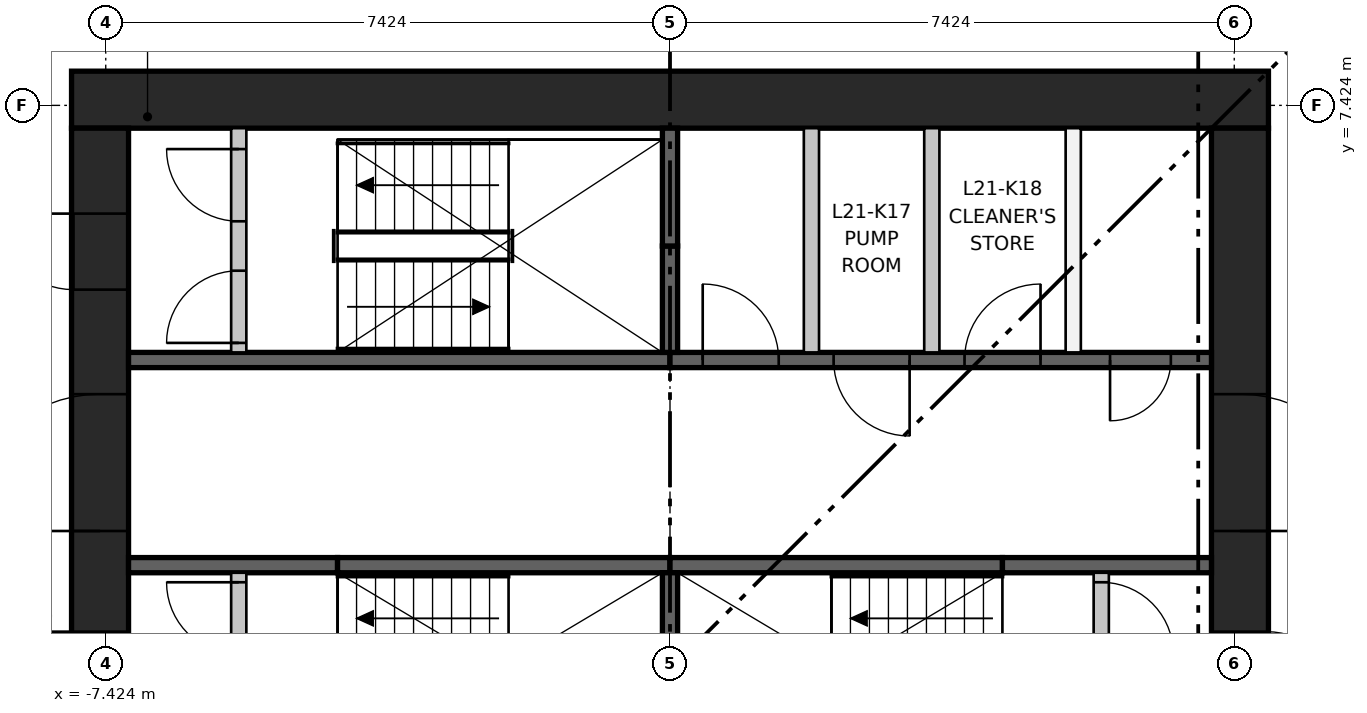
"""IFC4 building model, lengths in metres.
Left out: names, types, materials, properties, quantities, classifications, styles, units other than length and angle.
Written with IfcOpenShell. Run it as: python <this file> out.ifc"""

import sys

from ifc_helpers import new_model, si_unit, direction, frame, frame_2d, origin, place, context, subcontext, project, spatial, rectangle, extrude, element, fill, save


model = new_model("IFC4")
c1 = context("Model", 3, precision=1e-05, world=origin(), true_north=direction((0.0, 1.0)))
c2 = subcontext(c1, "Body", "Model", "MODEL_VIEW")
j1 = project(units=[si_unit("LENGTHUNIT", "METRE"), si_unit("PLANEANGLEUNIT", "RADIAN")], contexts=[c1])
p1 = place(None, origin())
s1 = spatial("IfcSite", under=j1, at=p1, CompositionType="ELEMENT")
p2 = place(p1, origin())
s2 = spatial("IfcBuilding", under=s1, at=p2, CompositionType="ELEMENT")
p3 = place(p2, frame((0.0, 0.0, 83.7)))
s3 = spatial("IfcBuildingStorey", under=s2, at=p3, CompositionType="ELEMENT", Elevation=83.7)
p4 = place(p3, frame((-7.874, 7.499, 0.0), z_axis=(0.0, 0.0, 1.0), x_axis=(1.0, 0.0, 0.0)))
e1 = element("IfcWall", 1, at=p4, inside=s3, PredefinedType="SHEAR", context=c2, shape_type="SweptSolid", body=[
    extrude(rectangle(XDim=15.748, YDim=0.75, at=frame_2d((7.874, 0.0))), origin(), (0.0, 0.0, 1.0), 3.65),
])
p5 = place(p3, frame((-7.499, -7.124, 0.0), z_axis=(0.0, 0.0, 1.0), x_axis=(0.0, 1.0, 0.0)))
e2 = element("IfcWall", 2, at=p5, inside=s3, PredefinedType="SHEAR", context=c2, shape_type="SweptSolid", body=[
    extrude(rectangle(XDim=14.248, YDim=0.75, at=frame_2d((7.124, 0.0))), origin(), (0.0, 0.0, 1.0), 3.65),
])
p6 = place(p5, frame((6.624, 0.0, 0.0)))
e3 = element("IfcOpeningElement", 3, at=p6, cuts=e2, PredefinedType="OPENING", context=c2, shape_type="SweptSolid", body=[
    extrude(rectangle(XDim=1.0, YDim=2.1, at=frame_2d((0.5, 1.05))), frame((0.0, 0.385, 0.0), z_axis=(0.0, -1.0, 0.0), x_axis=(1.0, 0.0, 0.0)), (0.0, 0.0, 1.0), 0.77),
])
p7 = place(p5, frame((3.5, 0.0, 0.0)))
e4 = element("IfcOpeningElement", 4, at=p7, cuts=e2, PredefinedType="OPENING", context=c2, shape_type="SweptSolid", body=[
    extrude(rectangle(XDim=1.8, YDim=2.1, at=frame_2d((0.9, 1.05))), frame((0.0, 0.385, 0.0), z_axis=(0.0, -1.0, 0.0), x_axis=(1.0, 0.0, 0.0)), (0.0, 0.0, 1.0), 0.77),
])
p8 = place(p5, frame((8.948, 0.0, 0.0)))
e5 = element("IfcOpeningElement", 5, at=p8, cuts=e2, PredefinedType="OPENING", context=c2, shape_type="SweptSolid", body=[
    extrude(rectangle(XDim=1.8, YDim=2.1, at=frame_2d((0.9, 1.05))), frame((0.0, 0.385, 0.0), z_axis=(0.0, -1.0, 0.0), x_axis=(1.0, 0.0, 0.0)), (0.0, 0.0, 1.0), 0.77),
])
p9 = place(p5, frame((12.124, 0.0, 0.0)))
e6 = element("IfcOpeningElement", 6, at=p9, cuts=e2, PredefinedType="OPENING", context=c2, shape_type="SweptSolid", body=[
    extrude(rectangle(XDim=1.0, YDim=2.1, at=frame_2d((0.5, 1.05))), frame((0.0, 0.385, 0.0), z_axis=(0.0, -1.0, 0.0), x_axis=(1.0, 0.0, 0.0)), (0.0, 0.0, 1.0), 0.77),
])
p10 = place(p3, frame((7.499, -7.124, 0.0), z_axis=(0.0, 0.0, 1.0), x_axis=(0.0, 1.0, 0.0)))
e7 = element("IfcWall", 7, at=p10, inside=s3, PredefinedType="SHEAR", context=c2, shape_type="SweptSolid", body=[
    extrude(rectangle(XDim=14.248, YDim=0.75, at=frame_2d((7.124, 0.0))), origin(), (0.0, 0.0, 1.0), 3.65),
])
p11 = place(p10, frame((6.624, 0.0, 0.0)))
e8 = element("IfcOpeningElement", 8, at=p11, cuts=e7, PredefinedType="OPENING", context=c2, shape_type="SweptSolid", body=[
    extrude(rectangle(XDim=1.0, YDim=2.1, at=frame_2d((0.5, 1.05))), frame((0.0, 0.385, 0.0), z_axis=(0.0, -1.0, 0.0), x_axis=(1.0, 0.0, 0.0)), (0.0, 0.0, 1.0), 0.77),
])
p12 = place(p10, frame((3.5, 0.0, 0.0)))
e9 = element("IfcOpeningElement", 9, at=p12, cuts=e7, PredefinedType="OPENING", context=c2, shape_type="SweptSolid", body=[
    extrude(rectangle(XDim=1.8, YDim=2.1, at=frame_2d((0.9, 1.05))), frame((0.0, 0.385, 0.0), z_axis=(0.0, -1.0, 0.0), x_axis=(1.0, 0.0, 0.0)), (0.0, 0.0, 1.0), 0.77),
])
p13 = place(p10, frame((8.948, 0.0, 0.0)))
e10 = element("IfcOpeningElement", 10, at=p13, cuts=e7, PredefinedType="OPENING", context=c2, shape_type="SweptSolid", body=[
    extrude(rectangle(XDim=1.8, YDim=2.1, at=frame_2d((0.9, 1.05))), frame((0.0, 0.385, 0.0), z_axis=(0.0, -1.0, 0.0), x_axis=(1.0, 0.0, 0.0)), (0.0, 0.0, 1.0), 0.77),
])
p14 = place(p3, frame((-7.124, 4.074, 0.0), z_axis=(0.0, 0.0, 1.0), x_axis=(1.0, 0.0, 0.0)))
e11 = element("IfcWall", 11, at=p14, inside=s3, PredefinedType="SHEAR", context=c2, shape_type="SweptSolid", body=[
    extrude(rectangle(XDim=7.124, YDim=0.2, at=frame_2d((3.562, 0.0))), origin(), (0.0, 0.0, 1.0), 3.3),
])
p15 = place(p3, frame((0.0, 4.074, 0.0), z_axis=(0.0, 0.0, 1.0), x_axis=(1.0, 0.0, 0.0)))
e12 = element("IfcWall", 12, at=p15, inside=s3, PredefinedType="SHEAR", context=c2, shape_type="SweptSolid", body=[
    extrude(rectangle(XDim=7.124, YDim=0.2, at=frame_2d((3.562, 0.0))), origin(), (0.0, 0.0, 1.0), 3.3),
])
p16 = place(p15, frame((0.43, 0.0, 0.0)))
e13 = element("IfcOpeningElement", 13, at=p16, cuts=e12, PredefinedType="OPENING", context=c2, shape_type="SweptSolid", body=[
    extrude(rectangle(XDim=1.0, YDim=2.1, at=frame_2d((0.5, 1.05))), frame((0.0, 0.11, 0.0), z_axis=(0.0, -1.0, 0.0), x_axis=(1.0, 0.0, 0.0)), (0.0, 0.0, 1.0), 0.22),
])
p17 = place(p15, frame((2.153, 0.0, 0.0)))
e14 = element("IfcOpeningElement", 14, at=p17, cuts=e12, PredefinedType="OPENING", context=c2, shape_type="SweptSolid", body=[
    extrude(rectangle(XDim=1.0, YDim=2.1, at=frame_2d((0.5, 1.05))), frame((0.0, 0.11, 0.0), z_axis=(0.0, -1.0, 0.0), x_axis=(1.0, 0.0, 0.0)), (0.0, 0.0, 1.0), 0.22),
])
p18 = place(p15, frame((3.875, 0.0, 0.0)))
e15 = element("IfcOpeningElement", 15, at=p18, cuts=e12, PredefinedType="OPENING", context=c2, shape_type="SweptSolid", body=[
    extrude(rectangle(XDim=1.0, YDim=2.1, at=frame_2d((0.5, 1.05))), frame((0.0, 0.11, 0.0), z_axis=(0.0, -1.0, 0.0), x_axis=(1.0, 0.0, 0.0)), (0.0, 0.0, 1.0), 0.22),
])
p19 = place(p15, frame((5.79, 0.0, 0.0)))
e16 = element("IfcOpeningElement", 16, at=p19, cuts=e12, PredefinedType="OPENING", context=c2, shape_type="SweptSolid", body=[
    extrude(rectangle(XDim=0.8, YDim=2.1, at=frame_2d((0.4, 1.05))), frame((0.0, 0.11, 0.0), z_axis=(0.0, -1.0, 0.0), x_axis=(1.0, 0.0, 0.0)), (0.0, 0.0, 1.0), 0.22),
])
p20 = place(p3, frame((-7.124, 1.375, 0.0), z_axis=(0.0, 0.0, 1.0), x_axis=(1.0, 0.0, 0.0)))
e17 = element("IfcWall", 17, at=p20, inside=s3, PredefinedType="SHEAR", context=c2, shape_type="SweptSolid", body=[
    extrude(rectangle(XDim=2.75, YDim=0.2, at=frame_2d((1.375, 0.0))), origin(), (0.0, 0.0, 1.0), 3.3),
])
for number, where, z_axis, x_axis in (
    (18, (-4.374, 1.375, 0.0), (0.0, 0.0, 1.0), (1.0, 0.0, 0.0)),
    (19, (0.0, 1.375, 0.0), (0.0, 0.0, 1.0), (1.0, 0.0, 0.0)),
):
    element("IfcWall", number, at=place(p3, frame(where, z_axis=z_axis, x_axis=x_axis)), inside=s3, PredefinedType="SHEAR", context=c2, shape_type="SweptSolid", body=[
        extrude(rectangle(XDim=4.374, YDim=0.2, at=frame_2d((2.187, 0.0))), origin(), (0.0, 0.0, 1.0), 3.3),
    ])
p21 = place(p3, frame((4.374, 1.375, 0.0), z_axis=(0.0, 0.0, 1.0), x_axis=(1.0, 0.0, 0.0)))
e20 = element("IfcWall", 20, at=p21, inside=s3, PredefinedType="SHEAR", context=c2, shape_type="SweptSolid", body=[
    extrude(rectangle(XDim=2.75, YDim=0.2, at=frame_2d((1.375, 0.0))), origin(), (0.0, 0.0, 1.0), 3.3),
])
p22 = place(p3, frame((0.0, -1.275, 0.0), z_axis=(0.0, 0.0, 1.0), x_axis=(0.0, 1.0, 0.0)))
e21 = element("IfcWall", 21, at=p22, inside=s3, PredefinedType="SHEAR", context=c2, shape_type="SweptSolid", body=[
    extrude(rectangle(XDim=2.55, YDim=0.2, at=frame_2d((1.275, 0.0))), origin(), (0.0, 0.0, 1.0), 3.3),
])
p23 = place(p3, frame((0.0, 4.174, 0.0), z_axis=(0.0, 0.0, 1.0), x_axis=(0.0, 1.0, 0.0)))
e22 = element("IfcWall", 22, at=p23, inside=s3, PredefinedType="SHEAR", context=c2, shape_type="SweptSolid", body=[
    extrude(rectangle(XDim=1.4, YDim=0.2, at=frame_2d((0.7, 0.0))), origin(), (0.0, 0.0, 1.0), 3.3),
])
p24 = place(p3, frame((0.0, 5.574, 0.0), z_axis=(0.0, 0.0, 1.0), x_axis=(0.0, 1.0, 0.0)))
e23 = element("IfcWall", 23, at=p24, inside=s3, PredefinedType="SHEAR", context=c2, shape_type="SweptSolid", body=[
    extrude(rectangle(XDim=1.55, YDim=0.2, at=frame_2d((0.775, 0.0))), origin(), (0.0, 0.0, 1.0), 3.3),
])
for number, where, z_axis, x_axis in (
    (24, (1.861, 4.174, 0.0), (0.0, 0.0, 1.0), (0.0, 1.0, 0.0)),
    (25, (3.445, 4.174, 0.0), (0.0, 0.0, 1.0), (0.0, 1.0, 0.0)),
    (26, (5.305, 4.174, 0.0), (0.0, 0.0, 1.0), (0.0, 1.0, 0.0)),
):
    element("IfcWall", number, at=place(p3, frame(where, z_axis=z_axis, x_axis=x_axis)), inside=s3, PredefinedType="PARTITIONING", context=c2, shape_type="SweptSolid", body=[
        extrude(rectangle(XDim=2.95, YDim=0.2, at=frame_2d((1.475, 0.0))), origin(), (0.0, 0.0, 1.0), 3.3),
    ])
p25 = place(p3, frame((-5.674, -1.275, 0.0), z_axis=(0.0, 0.0, 1.0), x_axis=(0.0, 1.0, 0.0)))
e27 = element("IfcWall", 27, at=p25, inside=s3, PredefinedType="PARTITIONING", context=c2, shape_type="SweptSolid", body=[
    extrude(rectangle(XDim=2.55, YDim=0.2, at=frame_2d((1.275, 0.0))), origin(), (0.0, 0.0, 1.0), 3.3),
])
p26 = place(p25, frame((0.125, 0.0, 0.0)))
e28 = element("IfcOpeningElement", 28, at=p26, cuts=e27, PredefinedType="OPENING", context=c2, shape_type="SweptSolid", body=[
    extrude(rectangle(XDim=0.95, YDim=2.1, at=frame_2d((0.475, 1.05))), frame((0.0, 0.11, 0.0), z_axis=(0.0, -1.0, 0.0), x_axis=(1.0, 0.0, 0.0)), (0.0, 0.0, 1.0), 0.22),
])
p27 = place(p25, frame((1.475, 0.0, 0.0)))
e29 = element("IfcOpeningElement", 29, at=p27, cuts=e27, PredefinedType="OPENING", context=c2, shape_type="SweptSolid", body=[
    extrude(rectangle(XDim=0.95, YDim=2.1, at=frame_2d((0.475, 1.05))), frame((0.0, 0.11, 0.0), z_axis=(0.0, -1.0, 0.0), x_axis=(1.0, 0.0, 0.0)), (0.0, 0.0, 1.0), 0.22),
])
p28 = place(p3, frame((5.674, -1.275, 0.0), z_axis=(0.0, 0.0, 1.0), x_axis=(0.0, 1.0, 0.0)))
e30 = element("IfcWall", 30, at=p28, inside=s3, PredefinedType="PARTITIONING", context=c2, shape_type="SweptSolid", body=[
    extrude(rectangle(XDim=2.55, YDim=0.2, at=frame_2d((1.275, 0.0))), origin(), (0.0, 0.0, 1.0), 3.3),
])
p29 = place(p28, frame((0.125, 0.0, 0.0)))
e31 = element("IfcOpeningElement", 31, at=p29, cuts=e30, PredefinedType="OPENING", context=c2, shape_type="SweptSolid", body=[
    extrude(rectangle(XDim=0.95, YDim=2.1, at=frame_2d((0.475, 1.05))), frame((0.0, 0.11, 0.0), z_axis=(0.0, -1.0, 0.0), x_axis=(1.0, 0.0, 0.0)), (0.0, 0.0, 1.0), 0.22),
])
p30 = place(p28, frame((1.475, 0.0, 0.0)))
e32 = element("IfcOpeningElement", 32, at=p30, cuts=e30, PredefinedType="OPENING", context=c2, shape_type="SweptSolid", body=[
    extrude(rectangle(XDim=0.95, YDim=2.1, at=frame_2d((0.475, 1.05))), frame((0.0, 0.11, 0.0), z_axis=(0.0, -1.0, 0.0), x_axis=(1.0, 0.0, 0.0)), (0.0, 0.0, 1.0), 0.22),
])
p31 = place(p3, frame((-5.674, 4.174, 0.0), z_axis=(0.0, 0.0, 1.0), x_axis=(0.0, 1.0, 0.0)))
e33 = element("IfcWall", 33, at=p31, inside=s3, PredefinedType="PARTITIONING", context=c2, shape_type="SweptSolid", body=[
    extrude(rectangle(XDim=2.95, YDim=0.2, at=frame_2d((1.475, 0.0))), origin(), (0.0, 0.0, 1.0), 3.3),
])
p32 = place(p31, frame((0.125, 0.0, 0.0)))
e34 = element("IfcOpeningElement", 34, at=p32, cuts=e33, PredefinedType="OPENING", context=c2, shape_type="SweptSolid", body=[
    extrude(rectangle(XDim=0.95, YDim=2.1, at=frame_2d((0.475, 1.05))), frame((0.0, 0.11, 0.0), z_axis=(0.0, -1.0, 0.0), x_axis=(1.0, 0.0, 0.0)), (0.0, 0.0, 1.0), 0.22),
])
p33 = place(p31, frame((1.725, 0.0, 0.0)))
e35 = element("IfcOpeningElement", 35, at=p33, cuts=e33, PredefinedType="OPENING", context=c2, shape_type="SweptSolid", body=[
    extrude(rectangle(XDim=0.95, YDim=2.1, at=frame_2d((0.475, 1.05))), frame((0.0, 0.11, 0.0), z_axis=(0.0, -1.0, 0.0), x_axis=(1.0, 0.0, 0.0)), (0.0, 0.0, 1.0), 0.22),
])
p34 = place(p27, origin())
e36 = element("IfcDoor", 36, at=p34, inside=s3, OperationType="SINGLE_SWING_RIGHT", PredefinedType="DOOR", context=c2, shape_type="SweptSolid", body=[
    extrude(rectangle(XDim=0.95, YDim=2.1, at=frame_2d((0.475, 1.05))), frame((0.0, 0.025, 0.0), z_axis=(0.0, -1.0, 0.0), x_axis=(1.0, 0.0, 0.0)), (0.0, 0.0, 1.0), 0.05),
])
fill(e29, e36)
p35 = place(p30, frame((0.95, 0.0, 0.0), z_axis=(0.0, 0.0, 1.0), x_axis=(-1.0, 0.0, 0.0)))
e37 = element("IfcDoor", 37, at=p35, inside=s3, OperationType="SINGLE_SWING_LEFT", PredefinedType="DOOR", context=c2, shape_type="SweptSolid", body=[
    extrude(rectangle(XDim=0.95, YDim=2.1, at=frame_2d((0.475, 1.05))), frame((0.0, 0.025, 0.0), z_axis=(0.0, -1.0, 0.0), x_axis=(1.0, 0.0, 0.0)), (0.0, 0.0, 1.0), 0.05),
])
fill(e32, e37)
p36 = place(p32, origin())
e38 = element("IfcDoor", 38, at=p36, inside=s3, OperationType="SINGLE_SWING_LEFT", PredefinedType="DOOR", context=c2, shape_type="SweptSolid", body=[
    extrude(rectangle(XDim=0.95, YDim=2.1, at=frame_2d((0.475, 1.05))), frame((0.0, 0.025, 0.0), z_axis=(0.0, -1.0, 0.0), x_axis=(1.0, 0.0, 0.0)), (0.0, 0.0, 1.0), 0.05),
])
fill(e34, e38)
p37 = place(p33, origin())
e39 = element("IfcDoor", 39, at=p37, inside=s3, OperationType="SINGLE_SWING_RIGHT", PredefinedType="DOOR", context=c2, shape_type="SweptSolid", body=[
    extrude(rectangle(XDim=0.95, YDim=2.1, at=frame_2d((0.475, 1.05))), frame((0.0, 0.025, 0.0), z_axis=(0.0, -1.0, 0.0), x_axis=(1.0, 0.0, 0.0)), (0.0, 0.0, 1.0), 0.05),
])
fill(e35, e39)
p38 = place(p16, origin())
e40 = element("IfcDoor", 40, at=p38, inside=s3, OperationType="SINGLE_SWING_LEFT", PredefinedType="DOOR", context=c2, shape_type="SweptSolid", body=[
    extrude(rectangle(XDim=1.0, YDim=2.1, at=frame_2d((0.5, 1.05))), frame((0.0, 0.025, 0.0), z_axis=(0.0, -1.0, 0.0), x_axis=(1.0, 0.0, 0.0)), (0.0, 0.0, 1.0), 0.05),
])
fill(e13, e40)
p39 = place(p17, frame((1.0, 0.0, 0.0), z_axis=(0.0, 0.0, 1.0), x_axis=(-1.0, 0.0, 0.0)))
e41 = element("IfcDoor", 41, at=p39, inside=s3, OperationType="SINGLE_SWING_RIGHT", PredefinedType="DOOR", context=c2, shape_type="SweptSolid", body=[
    extrude(rectangle(XDim=1.0, YDim=2.1, at=frame_2d((0.5, 1.05))), frame((0.0, 0.025, 0.0), z_axis=(0.0, -1.0, 0.0), x_axis=(1.0, 0.0, 0.0)), (0.0, 0.0, 1.0), 0.05),
])
fill(e14, e41)
p40 = place(p18, origin())
e42 = element("IfcDoor", 42, at=p40, inside=s3, OperationType="SINGLE_SWING_RIGHT", PredefinedType="DOOR", context=c2, shape_type="SweptSolid", body=[
    extrude(rectangle(XDim=1.0, YDim=2.1, at=frame_2d((0.5, 1.05))), frame((0.0, 0.025, 0.0), z_axis=(0.0, -1.0, 0.0), x_axis=(1.0, 0.0, 0.0)), (0.0, 0.0, 1.0), 0.05),
])
fill(e15, e42)
p41 = place(p19, frame((0.8, 0.0, 0.0), z_axis=(0.0, 0.0, 1.0), x_axis=(-1.0, 0.0, 0.0)))
e43 = element("IfcDoor", 43, at=p41, inside=s3, OperationType="SINGLE_SWING_LEFT", PredefinedType="DOOR", context=c2, shape_type="SweptSolid", body=[
    extrude(rectangle(XDim=0.8, YDim=2.1, at=frame_2d((0.4, 1.05))), frame((0.0, 0.025, 0.0), z_axis=(0.0, -1.0, 0.0), x_axis=(1.0, 0.0, 0.0)), (0.0, 0.0, 1.0), 0.05),
])
fill(e16, e43)
p42 = place(p6, origin())
e44 = element("IfcDoor", 44, at=p42, inside=s3, OperationType="SINGLE_SWING_RIGHT", PredefinedType="DOOR", context=c2, shape_type="SweptSolid", body=[
    extrude(rectangle(XDim=1.0, YDim=2.1, at=frame_2d((0.5, 1.05))), frame((0.0, 0.375, 0.0), z_axis=(0.0, -1.0, 0.0), x_axis=(1.0, 0.0, 0.0)), (0.0, 0.0, 1.0), 0.05),
])
fill(e3, e44)
p43 = place(p8, origin())
e45 = element("IfcDoor", 45, at=p43, inside=s3, OperationType="DOUBLE_DOOR_SINGLE_SWING", PredefinedType="DOOR", context=c2, shape_type="SweptSolid", body=[
    extrude(rectangle(XDim=1.8, YDim=2.1, at=frame_2d((0.9, 1.05))), frame((0.0, 0.025, 0.0), z_axis=(0.0, -1.0, 0.0), x_axis=(1.0, 0.0, 0.0)), (0.0, 0.0, 1.0), 0.05),
])
fill(e5, e45)
p44 = place(p9, origin())
e46 = element("IfcDoor", 46, at=p44, inside=s3, OperationType="SINGLE_SWING_RIGHT", PredefinedType="DOOR", context=c2, shape_type="SweptSolid", body=[
    extrude(rectangle(XDim=1.0, YDim=2.1, at=frame_2d((0.5, 1.05))), frame((0.0, 0.375, 0.0), z_axis=(0.0, -1.0, 0.0), x_axis=(1.0, 0.0, 0.0)), (0.0, 0.0, 1.0), 0.05),
])
fill(e6, e46)
p45 = place(p11, frame((1.0, 0.0, 0.0), z_axis=(0.0, 0.0, 1.0), x_axis=(-1.0, 0.0, 0.0)))
e47 = element("IfcDoor", 47, at=p45, inside=s3, OperationType="SINGLE_SWING_LEFT", PredefinedType="DOOR", context=c2, shape_type="SweptSolid", body=[
    extrude(rectangle(XDim=1.0, YDim=2.1, at=frame_2d((0.5, 1.05))), frame((0.0, 0.375, 0.0), z_axis=(0.0, -1.0, 0.0), x_axis=(1.0, 0.0, 0.0)), (0.0, 0.0, 1.0), 0.05),
])
fill(e8, e47)
p46 = place(p13, frame((1.8, 0.0, 0.0), z_axis=(0.0, 0.0, 1.0), x_axis=(-1.0, 0.0, 0.0)))
e48 = element("IfcDoor", 48, at=p46, inside=s3, OperationType="DOUBLE_DOOR_SINGLE_SWING", PredefinedType="DOOR", context=c2, shape_type="SweptSolid", body=[
    extrude(rectangle(XDim=1.8, YDim=2.1, at=frame_2d((0.9, 1.05))), frame((0.0, 0.025, 0.0), z_axis=(0.0, -1.0, 0.0), x_axis=(1.0, 0.0, 0.0)), (0.0, 0.0, 1.0), 0.05),
])
fill(e10, e48)
save(model, sys.argv[1])
